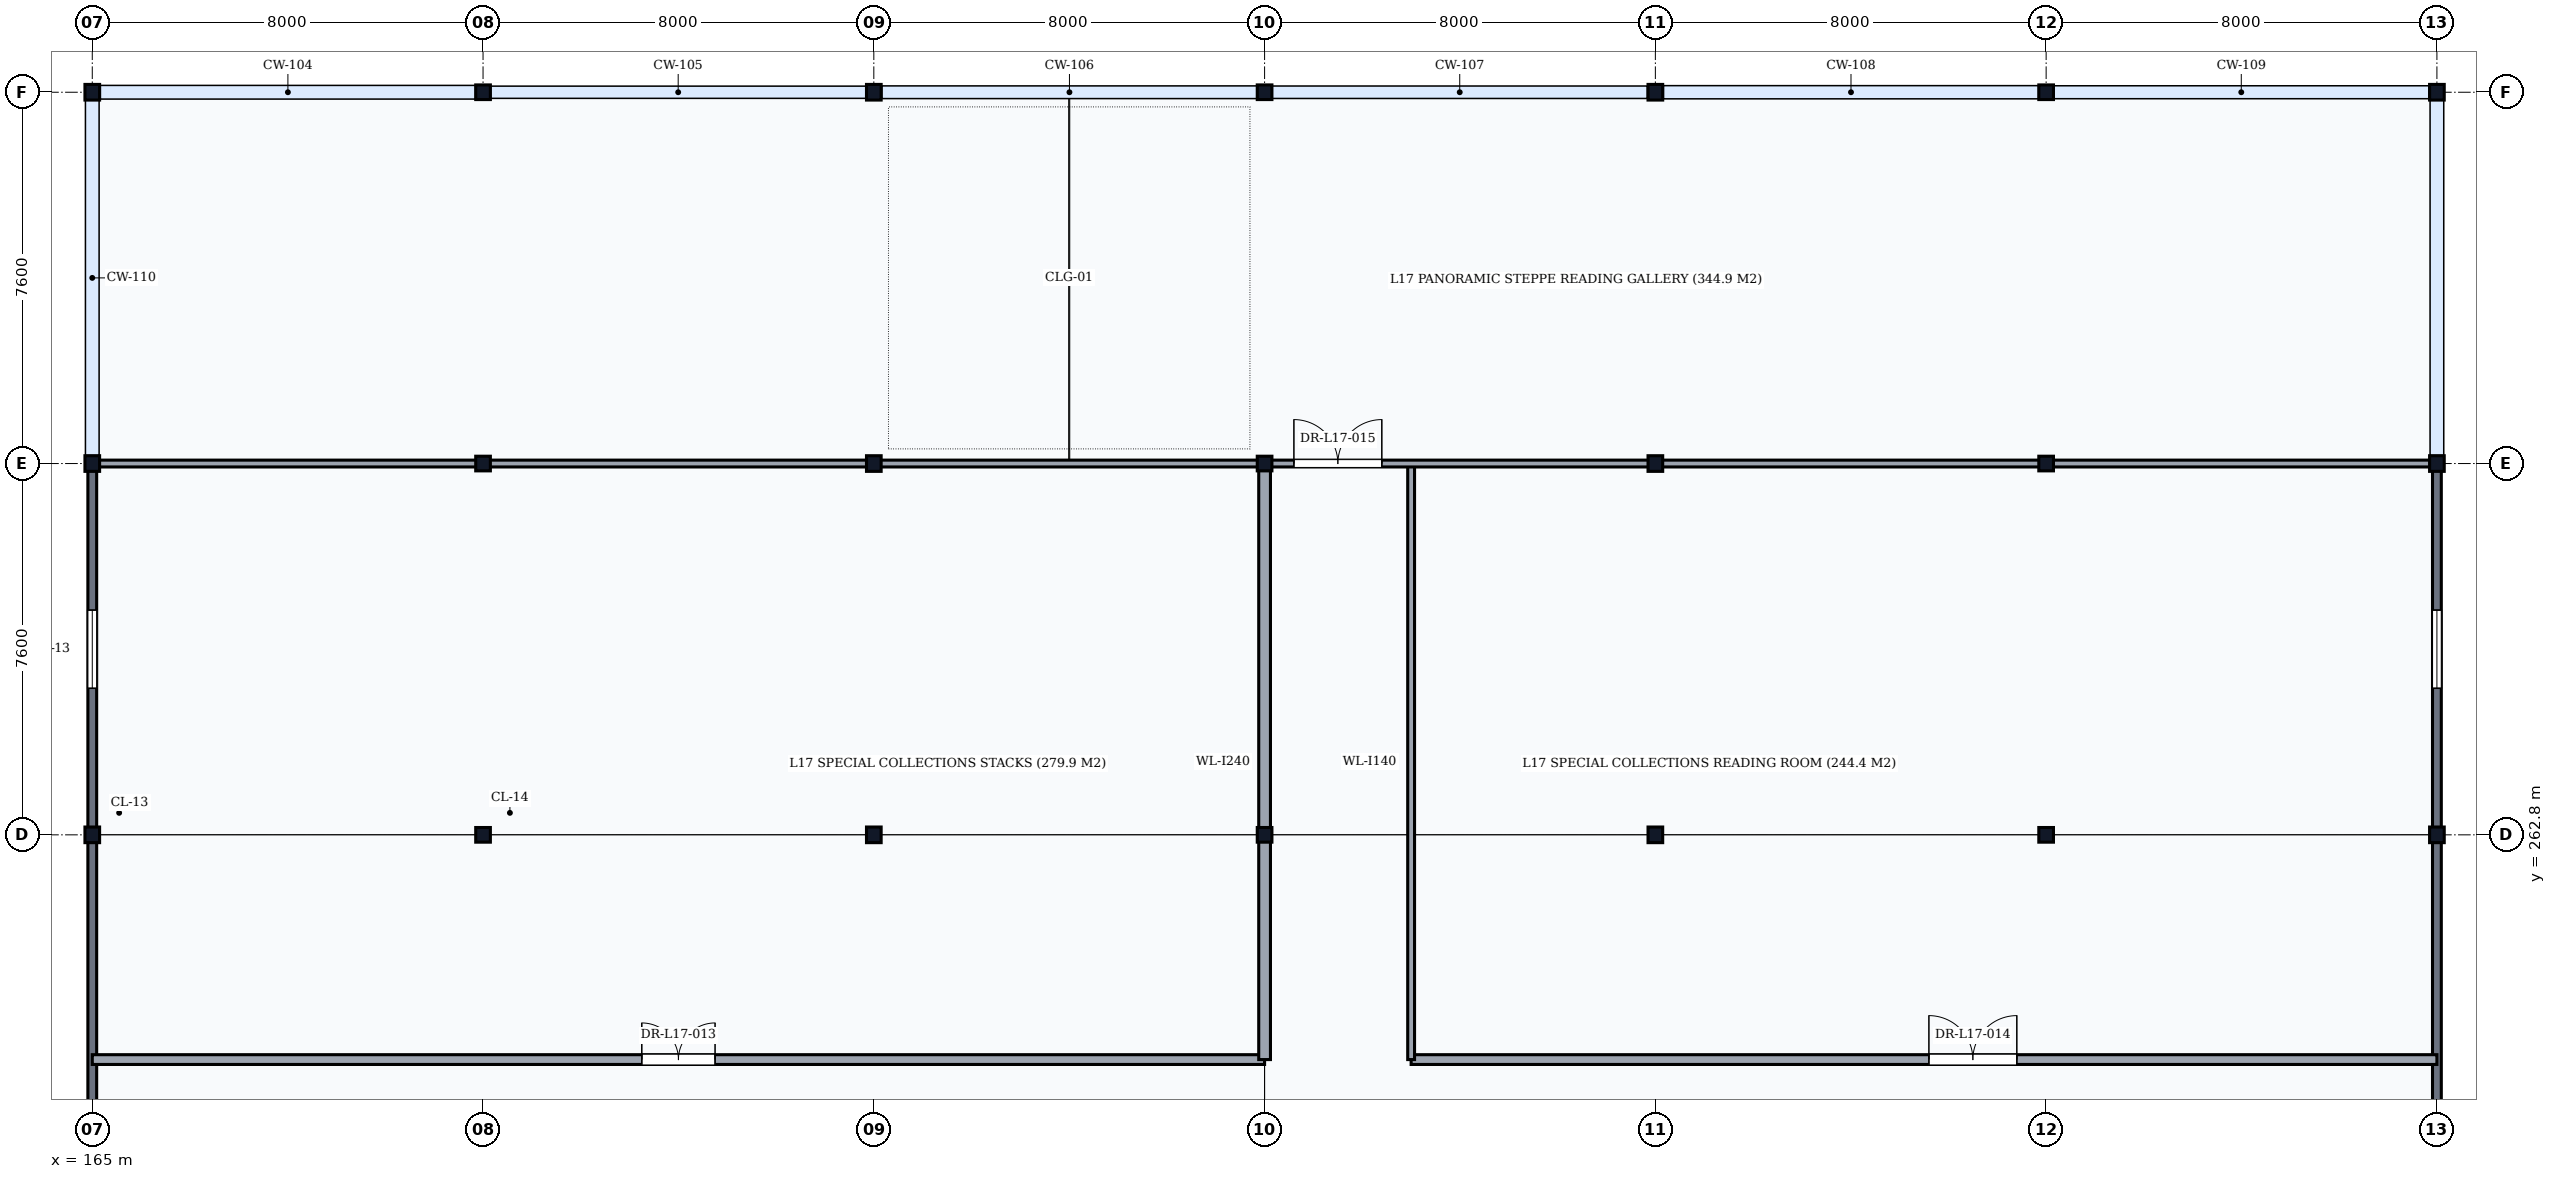
"""IFC4 building model, lengths in metres.
Left out: names, types, materials, properties, quantities, classifications, styles, units other than length and angle.
Written with IfcOpenShell. Run it as: python <this file> out.ifc"""

import sys

from ifc_helpers import new_model, si_unit, direction, frame, frame_2d, origin, origin_2d, place, context, subcontext, project, spatial, rectangle, i_section, extrude, element, fill, save


model = new_model("IFC4")
c1 = context("Model", 3, precision=1e-05, world=origin(), true_north=direction((0.0, 1.0)))
c2 = subcontext(c1, "Body", "Model", "MODEL_VIEW")
j1 = project(units=[si_unit("LENGTHUNIT", "METRE"), si_unit("PLANEANGLEUNIT", "RADIAN")], contexts=[c1])
p1 = place(None, origin())
s1 = spatial("IfcSite", under=j1, at=p1, CompositionType="ELEMENT")
p2 = place(p1, origin())
s2 = spatial("IfcBuilding", under=s1, at=p2, CompositionType="ELEMENT")
p3 = place(p2, frame((0.0, 0.0, 67.8)))
s3 = spatial("IfcBuildingStorey", under=s2, at=p3, CompositionType="ELEMENT", Elevation=67.8)
for number, where, z_axis, x_axis in (
    (1, (165.0, 262.8, 0.0), (0.0, 0.0, 1.0), (1.0, 0.0, 0.0)),
    (2, (165.0, 270.4, 0.0), (0.0, 0.0, 1.0), (1.0, 0.0, 0.0)),
    (3, (165.0, 278.0, 0.0), (0.0, 0.0, 1.0), (1.0, 0.0, 0.0)),
):
    element("IfcColumn", number, at=place(p3, frame(where, z_axis=z_axis, x_axis=x_axis)), inside=s3, PredefinedType="COLUMN", context=c2, shape_type="SweptSolid", body=[
        extrude(i_section(OverallWidth=0.3, OverallDepth=0.32, WebThickness=0.011, FlangeThickness=0.021, FilletRadius=0.027, at=origin_2d()), origin(), (0.0, 0.0, 1.0), 4.5),
    ])
for number, where, z_axis, x_axis in (
    (4, (173.0, 262.8, 0.0), (0.0, 0.0, 1.0), (1.0, 0.0, 0.0)),
    (5, (173.0, 270.4, 0.0), (0.0, 0.0, 1.0), (1.0, 0.0, 0.0)),
    (6, (173.0, 278.0, 0.0), (0.0, 0.0, 1.0), (1.0, 0.0, 0.0)),
):
    element("IfcColumn", number, at=place(p3, frame(where, z_axis=z_axis, x_axis=x_axis)), inside=s3, PredefinedType="COLUMN", context=c2, shape_type="SweptSolid", body=[
        extrude(i_section(OverallWidth=0.3, OverallDepth=0.3, WebThickness=0.011, FlangeThickness=0.019, FilletRadius=0.027, at=origin_2d()), origin(), (0.0, 0.0, 1.0), 4.5),
    ])
for number, where, z_axis, x_axis in (
    (7, (181.0, 262.8, 0.0), (0.0, 0.0, 1.0), (1.0, 0.0, 0.0)),
    (8, (181.0, 270.4, 0.0), (0.0, 0.0, 1.0), (1.0, 0.0, 0.0)),
    (9, (181.0, 278.0, 0.0), (0.0, 0.0, 1.0), (1.0, 0.0, 0.0)),
):
    element("IfcColumn", number, at=place(p3, frame(where, z_axis=z_axis, x_axis=x_axis)), inside=s3, PredefinedType="COLUMN", context=c2, shape_type="SweptSolid", body=[
        extrude(i_section(OverallWidth=0.3, OverallDepth=0.32, WebThickness=0.011, FlangeThickness=0.021, FilletRadius=0.027, at=origin_2d()), origin(), (0.0, 0.0, 1.0), 4.5),
    ])
for number, where, z_axis, x_axis in (
    (10, (189.0, 262.8, 0.0), (0.0, 0.0, 1.0), (1.0, 0.0, 0.0)),
    (11, (189.0, 270.4, 0.0), (0.0, 0.0, 1.0), (1.0, 0.0, 0.0)),
    (12, (189.0, 278.0, 0.0), (0.0, 0.0, 1.0), (1.0, 0.0, 0.0)),
):
    element("IfcColumn", number, at=place(p3, frame(where, z_axis=z_axis, x_axis=x_axis)), inside=s3, PredefinedType="COLUMN", context=c2, shape_type="SweptSolid", body=[
        extrude(i_section(OverallWidth=0.3, OverallDepth=0.3, WebThickness=0.011, FlangeThickness=0.019, FilletRadius=0.027, at=origin_2d()), origin(), (0.0, 0.0, 1.0), 4.5),
    ])
for number, where, z_axis, x_axis in (
    (13, (197.0, 262.8, 0.0), (0.0, 0.0, 1.0), (1.0, 0.0, 0.0)),
    (14, (197.0, 270.4, 0.0), (0.0, 0.0, 1.0), (1.0, 0.0, 0.0)),
    (15, (197.0, 278.0, 0.0), (0.0, 0.0, 1.0), (1.0, 0.0, 0.0)),
):
    element("IfcColumn", number, at=place(p3, frame(where, z_axis=z_axis, x_axis=x_axis)), inside=s3, PredefinedType="COLUMN", context=c2, shape_type="SweptSolid", body=[
        extrude(i_section(OverallWidth=0.3, OverallDepth=0.32, WebThickness=0.011, FlangeThickness=0.021, FilletRadius=0.027, at=origin_2d()), origin(), (0.0, 0.0, 1.0), 4.5),
    ])
for number, where, z_axis, x_axis in (
    (16, (205.0, 262.8, 0.0), (0.0, 0.0, 1.0), (1.0, 0.0, 0.0)),
    (17, (205.0, 270.4, 0.0), (0.0, 0.0, 1.0), (1.0, 0.0, 0.0)),
    (18, (205.0, 278.0, 0.0), (0.0, 0.0, 1.0), (1.0, 0.0, 0.0)),
):
    element("IfcColumn", number, at=place(p3, frame(where, z_axis=z_axis, x_axis=x_axis)), inside=s3, PredefinedType="COLUMN", context=c2, shape_type="SweptSolid", body=[
        extrude(i_section(OverallWidth=0.3, OverallDepth=0.3, WebThickness=0.011, FlangeThickness=0.019, FilletRadius=0.027, at=origin_2d()), origin(), (0.0, 0.0, 1.0), 4.5),
    ])
for number, where, z_axis, x_axis in (
    (19, (213.0, 262.8, 0.0), (0.0, 0.0, 1.0), (1.0, 0.0, 0.0)),
    (20, (213.0, 270.4, 0.0), (0.0, 0.0, 1.0), (1.0, 0.0, 0.0)),
    (21, (213.0, 278.0, 0.0), (0.0, 0.0, 1.0), (1.0, 0.0, 0.0)),
):
    element("IfcColumn", number, at=place(p3, frame(where, z_axis=z_axis, x_axis=x_axis)), inside=s3, PredefinedType="COLUMN", context=c2, shape_type="SweptSolid", body=[
        extrude(i_section(OverallWidth=0.3, OverallDepth=0.32, WebThickness=0.011, FlangeThickness=0.021, FilletRadius=0.027, at=origin_2d()), origin(), (0.0, 0.0, 1.0), 4.5),
    ])
p4 = place(p3, frame((165.0, 255.206, 0.0), z_axis=(0.0, 0.0, 1.0), x_axis=(0.0, 1.0, 0.0)))
e22 = element("IfcWall", 22, at=p4, inside=s3, PredefinedType="SOLIDWALL", context=c2, shape_type="SweptSolid", body=[
    extrude(rectangle(XDim=7.588, YDim=0.18, at=frame_2d((3.794, 0.0))), origin(), (0.0, 0.0, 1.0), 4.028),
])
p5 = place(p3, frame((165.0, 262.806, 0.0), z_axis=(0.0, 0.0, 1.0), x_axis=(0.0, 1.0, 0.0)))
e23 = element("IfcWall", 23, at=p5, inside=s3, PredefinedType="SOLIDWALL", context=c2, shape_type="SweptSolid", body=[
    extrude(rectangle(XDim=7.588, YDim=0.18, at=frame_2d((3.794, 0.0))), origin(), (0.0, 0.0, 1.0), 4.028),
])
p6 = place(p5, frame((2.994, 0.0, 0.95)))
e24 = element("IfcOpeningElement", 24, at=p6, cuts=e23, PredefinedType="OPENING", context=c2, shape_type="SweptSolid", body=[
    extrude(rectangle(XDim=1.6, YDim=2.0, at=frame_2d((0.8, 1.0))), frame((0.0, 0.105, 0.0), z_axis=(0.0, -1.0, 0.0), x_axis=(1.0, 0.0, 0.0)), (0.0, 0.0, 1.0), 0.21),
])
p7 = place(p3, frame((213.0, 255.206, 0.0), z_axis=(0.0, 0.0, 1.0), x_axis=(0.0, 1.0, 0.0)))
e25 = element("IfcWall", 25, at=p7, inside=s3, PredefinedType="SOLIDWALL", context=c2, shape_type="SweptSolid", body=[
    extrude(rectangle(XDim=7.588, YDim=0.18, at=frame_2d((3.794, 0.0))), origin(), (0.0, 0.0, 1.0), 4.028),
])
p8 = place(p3, frame((213.0, 262.806, 0.0), z_axis=(0.0, 0.0, 1.0), x_axis=(0.0, 1.0, 0.0)))
e26 = element("IfcWall", 26, at=p8, inside=s3, PredefinedType="SOLIDWALL", context=c2, shape_type="SweptSolid", body=[
    extrude(rectangle(XDim=7.588, YDim=0.18, at=frame_2d((3.794, 0.0))), origin(), (0.0, 0.0, 1.0), 4.028),
])
p9 = place(p8, frame((2.994, 0.0, 0.95)))
e27 = element("IfcOpeningElement", 27, at=p9, cuts=e26, PredefinedType="OPENING", context=c2, shape_type="SweptSolid", body=[
    extrude(rectangle(XDim=1.6, YDim=2.0, at=frame_2d((0.8, 1.0))), frame((0.0, 0.105, 0.0), z_axis=(0.0, -1.0, 0.0), x_axis=(1.0, 0.0, 0.0)), (0.0, 0.0, 1.0), 0.21),
])
p10 = place(p3, frame((165.0, 258.2, 0.0), z_axis=(0.0, 0.0, 1.0), x_axis=(1.0, 0.0, 0.0)))
e28 = element("IfcWall", 28, at=p10, inside=s3, PredefinedType="PARTITIONING", context=c2, shape_type="SweptSolid", body=[
    extrude(rectangle(XDim=24.0, YDim=0.2, at=frame_2d((12.0, 0.0))), origin(), (0.0, 0.0, 1.0), 4.3),
])
p11 = place(p10, frame((11.25, 0.0, 0.0)))
e29 = element("IfcOpeningElement", 29, at=p11, cuts=e28, PredefinedType="OPENING", context=c2, shape_type="SweptSolid", body=[
    extrude(rectangle(XDim=1.5, YDim=2.25, at=frame_2d((0.75, 1.125))), frame((0.0, 0.115, 0.0), z_axis=(0.0, -1.0, 0.0), x_axis=(1.0, 0.0, 0.0)), (0.0, 0.0, 1.0), 0.23),
])
p12 = place(p3, frame((192.0, 258.2, 0.0), z_axis=(0.0, 0.0, 1.0), x_axis=(1.0, 0.0, 0.0)))
e30 = element("IfcWall", 30, at=p12, inside=s3, PredefinedType="PARTITIONING", context=c2, shape_type="SweptSolid", body=[
    extrude(rectangle(XDim=21.0, YDim=0.2, at=frame_2d((10.5, 0.0))), origin(), (0.0, 0.0, 1.0), 4.3),
])
p13 = place(p12, frame((10.6, 0.0, 0.0)))
e31 = element("IfcOpeningElement", 31, at=p13, cuts=e30, PredefinedType="OPENING", context=c2, shape_type="SweptSolid", body=[
    extrude(rectangle(XDim=1.8, YDim=2.4, at=frame_2d((0.9, 1.2))), frame((0.0, 0.115, 0.0), z_axis=(0.0, -1.0, 0.0), x_axis=(1.0, 0.0, 0.0)), (0.0, 0.0, 1.0), 0.23),
])
p14 = place(p3, frame((189.0, 258.2, 0.0), z_axis=(0.0, 0.0, 1.0), x_axis=(0.0, 1.0, 0.0)))
e32 = element("IfcWall", 32, at=p14, inside=s3, PredefinedType="PARTITIONING", context=c2, shape_type="SweptSolid", body=[
    extrude(rectangle(XDim=12.2, YDim=0.24, at=frame_2d((6.1, 0.0))), origin(), (0.0, 0.0, 1.0), 3.898),
])
p15 = place(p3, frame((192.0, 258.2, 0.0), z_axis=(0.0, 0.0, 1.0), x_axis=(0.0, 1.0, 0.0)))
e33 = element("IfcWall", 33, at=p15, inside=s3, PredefinedType="PARTITIONING", context=c2, shape_type="SweptSolid", body=[
    extrude(rectangle(XDim=12.2, YDim=0.14, at=frame_2d((6.1, 0.0))), origin(), (0.0, 0.0, 1.0), 4.3),
])
p16 = place(p3, frame((165.0, 270.4, 0.0), z_axis=(0.0, 0.0, 1.0), x_axis=(1.0, 0.0, 0.0)))
e34 = element("IfcWall", 34, at=p16, inside=s3, PredefinedType="PARTITIONING", context=c2, shape_type="SweptSolid", body=[
    extrude(rectangle(XDim=48.0, YDim=0.14, at=frame_2d((24.0, 0.0))), origin(), (0.0, 0.0, 1.0), 3.798),
])
p17 = place(p16, frame((24.6, 0.0, 0.0)))
e35 = element("IfcOpeningElement", 35, at=p17, cuts=e34, PredefinedType="OPENING", context=c2, shape_type="SweptSolid", body=[
    extrude(rectangle(XDim=1.8, YDim=2.4, at=frame_2d((0.9, 1.2))), frame((0.0, 0.085, 0.0), z_axis=(0.0, -1.0, 0.0), x_axis=(1.0, 0.0, 0.0)), (0.0, 0.0, 1.0), 0.17),
])
p18 = place(p6, origin())
e36 = element("IfcWindow", 36, at=p18, inside=s3, PartitioningType="SINGLE_PANEL", PredefinedType="WINDOW", context=c2, shape_type="SweptSolid", body=[
    extrude(rectangle(XDim=1.6, YDim=2.0, at=frame_2d((0.8, 1.0))), frame((0.0, 0.03, 0.0), z_axis=(0.0, -1.0, 0.0), x_axis=(1.0, 0.0, 0.0)), (0.0, 0.0, 1.0), 0.06),
])
fill(e24, e36)
p19 = place(p9, origin())
e37 = element("IfcWindow", 37, at=p19, inside=s3, PartitioningType="SINGLE_PANEL", PredefinedType="WINDOW", context=c2, shape_type="SweptSolid", body=[
    extrude(rectangle(XDim=1.6, YDim=2.0, at=frame_2d((0.8, 1.0))), frame((0.0, 0.03, 0.0), z_axis=(0.0, -1.0, 0.0), x_axis=(1.0, 0.0, 0.0)), (0.0, 0.0, 1.0), 0.06),
])
fill(e27, e37)
p20 = place(p11, origin())
e38 = element("IfcDoor", 38, at=p20, inside=s3, OperationType="DOUBLE_DOOR_SINGLE_SWING", PredefinedType="DOOR", context=c2, shape_type="SweptSolid", body=[
    extrude(rectangle(XDim=1.5, YDim=2.25, at=frame_2d((0.75, 1.125))), frame((0.0, 0.025, 0.0), z_axis=(0.0, -1.0, 0.0), x_axis=(1.0, 0.0, 0.0)), (0.0, 0.0, 1.0), 0.05),
])
fill(e29, e38)
p21 = place(p13, origin())
e39 = element("IfcDoor", 39, at=p21, inside=s3, OperationType="DOUBLE_DOOR_SINGLE_SWING", PredefinedType="DOOR", context=c2, shape_type="SweptSolid", body=[
    extrude(rectangle(XDim=1.8, YDim=2.4, at=frame_2d((0.9, 1.2))), frame((0.0, 0.025, 0.0), z_axis=(0.0, -1.0, 0.0), x_axis=(1.0, 0.0, 0.0)), (0.0, 0.0, 1.0), 0.05),
])
fill(e31, e39)
p22 = place(p17, origin())
e40 = element("IfcDoor", 40, at=p22, inside=s3, OperationType="DOUBLE_DOOR_SINGLE_SWING", PredefinedType="DOOR", context=c2, shape_type="SweptSolid", body=[
    extrude(rectangle(XDim=1.8, YDim=2.4, at=frame_2d((0.9, 1.2))), frame((0.0, 0.025, 0.0), z_axis=(0.0, -1.0, 0.0), x_axis=(1.0, 0.0, 0.0)), (0.0, 0.0, 1.0), 0.05),
])
fill(e35, e40)
save(model, sys.argv[1])
